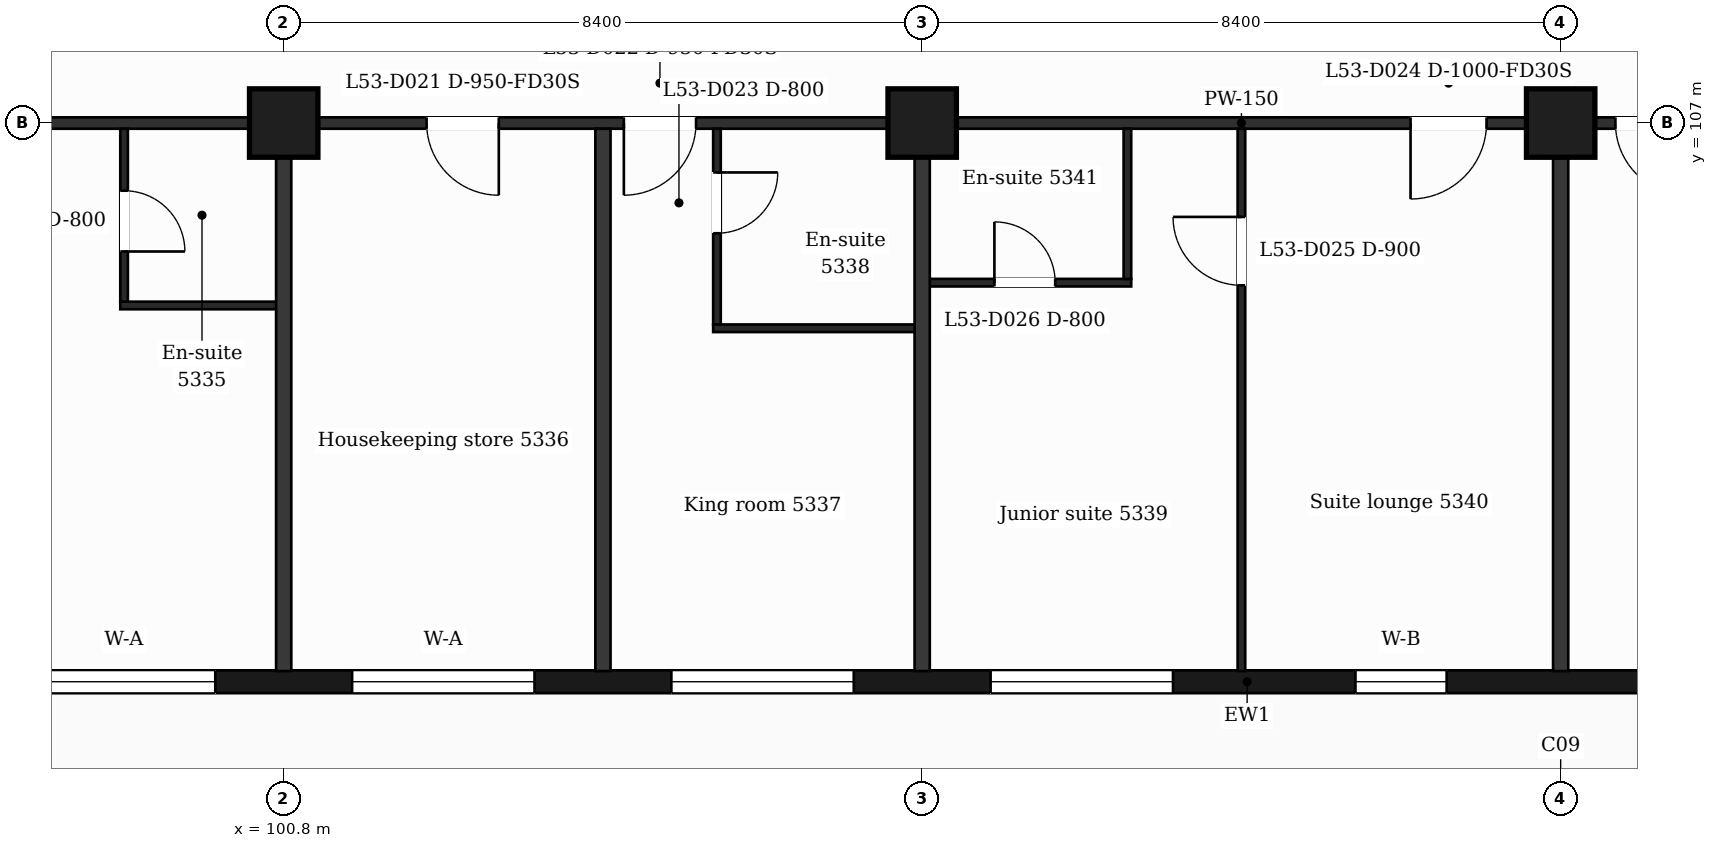
"""IFC4 building model, lengths in metres.
Left out: names, types, materials, properties, quantities, classifications, styles, units other than length and angle.
Written with IfcOpenShell. Run it as: python <this file> out.ifc"""

import sys

from ifc_helpers import new_model, si_unit, direction, frame, frame_2d, origin, origin_2d, place, context, subcontext, project, spatial, rectangle, extrude, element, fill, save


model = new_model("IFC4")
c1 = context("Model", 3, precision=1e-05, world=origin(), true_north=direction((0.0, 1.0)))
c2 = subcontext(c1, "Body", "Model", "MODEL_VIEW")
j1 = project(units=[si_unit("LENGTHUNIT", "METRE"), si_unit("PLANEANGLEUNIT", "RADIAN")], contexts=[c1])
p1 = place(None, origin())
s1 = spatial("IfcSite", under=j1, at=p1, CompositionType="ELEMENT")
p2 = place(p1, origin())
s2 = spatial("IfcBuilding", under=s1, at=p2, CompositionType="ELEMENT")
p3 = place(p2, frame((0.0, 0.0, 220.7)))
s3 = spatial("IfcBuildingStorey", under=s2, at=p3, CompositionType="ELEMENT", Elevation=220.7)
for number, where, z_axis, x_axis in (
    (1, (100.8, 107.0, 0.0), (0.0, 0.0, 1.0), (1.0, 0.0, 0.0)),
    (2, (109.2, 107.0, 0.0), (0.0, 0.0, 1.0), (1.0, 0.0, 0.0)),
    (3, (117.6, 107.0, 0.0), (0.0, 0.0, 1.0), (1.0, 0.0, 0.0)),
):
    element("IfcColumn", number, at=place(p3, frame(where, z_axis=z_axis, x_axis=x_axis)), inside=s3, PredefinedType="COLUMN", context=c2, shape_type="SweptSolid", body=[
        extrude(rectangle(XDim=0.9, YDim=0.9, at=origin_2d()), origin(), (0.0, 0.0, 1.0), 3.7),
    ])
p4 = place(p3, frame((89.85, 99.65, 0.0), z_axis=(0.0, 0.0, 1.0), x_axis=(1.0, 0.0, 0.0)))
e4 = element("IfcWall", 4, at=p4, inside=s3, PredefinedType="SOLIDWALL", context=c2, shape_type="SweptSolid", body=[
    extrude(rectangle(XDim=47.25, YDim=0.3, at=frame_2d((23.625, 0.0))), origin(), (0.0, 0.0, 1.0), 3.38),
])
p5 = place(p4, frame((0.725, 0.0, 0.9)))
e5 = element("IfcOpeningElement", 5, at=p5, cuts=e4, PredefinedType="OPENING", context=c2, shape_type="SweptSolid", body=[
    extrude(rectangle(XDim=1.2, YDim=2.1, at=frame_2d((0.6, 1.05))), frame((0.0, 0.16, 0.0), z_axis=(0.0, -1.0, 0.0), x_axis=(1.0, 0.0, 0.0)), (0.0, 0.0, 1.0), 0.32),
])
p6 = place(p4, frame((3.45, 0.0, 0.9)))
e6 = element("IfcOpeningElement", 6, at=p6, cuts=e4, PredefinedType="OPENING", context=c2, shape_type="SweptSolid", body=[
    extrude(rectangle(XDim=2.4, YDim=2.1, at=frame_2d((1.2, 1.05))), frame((0.0, 0.16, 0.0), z_axis=(0.0, -1.0, 0.0), x_axis=(1.0, 0.0, 0.0)), (0.0, 0.0, 1.0), 0.32),
])
p7 = place(p4, frame((7.65, 0.0, 0.9)))
e7 = element("IfcOpeningElement", 7, at=p7, cuts=e4, PredefinedType="OPENING", context=c2, shape_type="SweptSolid", body=[
    extrude(rectangle(XDim=2.4, YDim=2.1, at=frame_2d((1.2, 1.05))), frame((0.0, 0.16, 0.0), z_axis=(0.0, -1.0, 0.0), x_axis=(1.0, 0.0, 0.0)), (0.0, 0.0, 1.0), 0.32),
])
p8 = place(p4, frame((11.85, 0.0, 0.9)))
e8 = element("IfcOpeningElement", 8, at=p8, cuts=e4, PredefinedType="OPENING", context=c2, shape_type="SweptSolid", body=[
    extrude(rectangle(XDim=2.4, YDim=2.1, at=frame_2d((1.2, 1.05))), frame((0.0, 0.16, 0.0), z_axis=(0.0, -1.0, 0.0), x_axis=(1.0, 0.0, 0.0)), (0.0, 0.0, 1.0), 0.32),
])
p9 = place(p4, frame((16.05, 0.0, 0.9)))
e9 = element("IfcOpeningElement", 9, at=p9, cuts=e4, PredefinedType="OPENING", context=c2, shape_type="SweptSolid", body=[
    extrude(rectangle(XDim=2.4, YDim=2.1, at=frame_2d((1.2, 1.05))), frame((0.0, 0.16, 0.0), z_axis=(0.0, -1.0, 0.0), x_axis=(1.0, 0.0, 0.0)), (0.0, 0.0, 1.0), 0.32),
])
p10 = place(p4, frame((20.25, 0.0, 0.9)))
e10 = element("IfcOpeningElement", 10, at=p10, cuts=e4, PredefinedType="OPENING", context=c2, shape_type="SweptSolid", body=[
    extrude(rectangle(XDim=2.4, YDim=2.1, at=frame_2d((1.2, 1.05))), frame((0.0, 0.16, 0.0), z_axis=(0.0, -1.0, 0.0), x_axis=(1.0, 0.0, 0.0)), (0.0, 0.0, 1.0), 0.32),
])
p11 = place(p4, frame((25.05, 0.0, 0.9)))
e11 = element("IfcOpeningElement", 11, at=p11, cuts=e4, PredefinedType="OPENING", context=c2, shape_type="SweptSolid", body=[
    extrude(rectangle(XDim=1.2, YDim=2.1, at=frame_2d((0.6, 1.05))), frame((0.0, 0.16, 0.0), z_axis=(0.0, -1.0, 0.0), x_axis=(1.0, 0.0, 0.0)), (0.0, 0.0, 1.0), 0.32),
])
p12 = place(p4, frame((29.25, 0.0, 0.9)))
e12 = element("IfcOpeningElement", 12, at=p12, cuts=e4, PredefinedType="OPENING", context=c2, shape_type="SweptSolid", body=[
    extrude(rectangle(XDim=1.2, YDim=2.1, at=frame_2d((0.6, 1.05))), frame((0.0, 0.16, 0.0), z_axis=(0.0, -1.0, 0.0), x_axis=(1.0, 0.0, 0.0)), (0.0, 0.0, 1.0), 0.32),
])
p13 = place(p4, frame((32.55, 0.0, 0.0)))
e13 = element("IfcOpeningElement", 13, at=p13, cuts=e4, PredefinedType="OPENING", context=c2, shape_type="SweptSolid", body=[
    extrude(rectangle(XDim=1.2, YDim=2.4, at=frame_2d((0.6, 1.2))), frame((0.0, 0.16, 0.0), z_axis=(0.0, -1.0, 0.0), x_axis=(1.0, 0.0, 0.0)), (0.0, 0.0, 1.0), 0.32),
])
p14 = place(p4, frame((34.35, 0.0, 0.9)))
e14 = element("IfcOpeningElement", 14, at=p14, cuts=e4, PredefinedType="OPENING", context=c2, shape_type="SweptSolid", body=[
    extrude(rectangle(XDim=1.2, YDim=2.1, at=frame_2d((0.6, 1.05))), frame((0.0, 0.16, 0.0), z_axis=(0.0, -1.0, 0.0), x_axis=(1.0, 0.0, 0.0)), (0.0, 0.0, 1.0), 0.32),
])
p15 = place(p4, frame((37.05, 0.0, 0.9)))
e15 = element("IfcOpeningElement", 15, at=p15, cuts=e4, PredefinedType="OPENING", context=c2, shape_type="SweptSolid", body=[
    extrude(rectangle(XDim=2.4, YDim=2.1, at=frame_2d((1.2, 1.05))), frame((0.0, 0.16, 0.0), z_axis=(0.0, -1.0, 0.0), x_axis=(1.0, 0.0, 0.0)), (0.0, 0.0, 1.0), 0.32),
])
p16 = place(p4, frame((40.95, 0.0, 0.0)))
e16 = element("IfcOpeningElement", 16, at=p16, cuts=e4, PredefinedType="OPENING", context=c2, shape_type="SweptSolid", body=[
    extrude(rectangle(XDim=1.2, YDim=2.4, at=frame_2d((0.6, 1.2))), frame((0.0, 0.16, 0.0), z_axis=(0.0, -1.0, 0.0), x_axis=(1.0, 0.0, 0.0)), (0.0, 0.0, 1.0), 0.32),
])
p17 = place(p4, frame((42.75, 0.0, 0.9)))
e17 = element("IfcOpeningElement", 17, at=p17, cuts=e4, PredefinedType="OPENING", context=c2, shape_type="SweptSolid", body=[
    extrude(rectangle(XDim=1.2, YDim=2.1, at=frame_2d((0.6, 1.05))), frame((0.0, 0.16, 0.0), z_axis=(0.0, -1.0, 0.0), x_axis=(1.0, 0.0, 0.0)), (0.0, 0.0, 1.0), 0.32),
])
p18 = place(p4, frame((45.25, 0.0, 0.9)))
e18 = element("IfcOpeningElement", 18, at=p18, cuts=e4, PredefinedType="OPENING", context=c2, shape_type="SweptSolid", body=[
    extrude(rectangle(XDim=1.2, YDim=2.1, at=frame_2d((0.6, 1.05))), frame((0.0, 0.16, 0.0), z_axis=(0.0, -1.0, 0.0), x_axis=(1.0, 0.0, 0.0)), (0.0, 0.0, 1.0), 0.32),
])
p19 = place(p3, frame((106.45, 104.3, 0.0), z_axis=(0.0, 0.0, 1.0), x_axis=(1.0, 0.0, 0.0)))
e19 = element("IfcWall", 19, at=p19, inside=s3, PredefinedType="PARTITIONING", context=c2, shape_type="SweptSolid", body=[
    extrude(rectangle(XDim=2.75, YDim=0.1, at=frame_2d((1.375, 0.0))), origin(), (0.0, 0.0, 1.0), 3.38),
])
p20 = place(p3, frame((98.65, 104.6, 0.0), z_axis=(0.0, 0.0, 1.0), x_axis=(1.0, 0.0, 0.0)))
e20 = element("IfcWall", 20, at=p20, inside=s3, PredefinedType="PARTITIONING", context=c2, shape_type="SweptSolid", body=[
    extrude(rectangle(XDim=2.15, YDim=0.1, at=frame_2d((1.075, 0.0))), origin(), (0.0, 0.0, 1.0), 3.38),
])
p21 = place(p3, frame((109.2, 104.9, 0.0), z_axis=(0.0, 0.0, 1.0), x_axis=(1.0, 0.0, 0.0)))
e21 = element("IfcWall", 21, at=p21, inside=s3, PredefinedType="PARTITIONING", context=c2, shape_type="SweptSolid", body=[
    extrude(rectangle(XDim=2.75, YDim=0.1, at=frame_2d((1.375, 0.0))), origin(), (0.0, 0.0, 1.0), 3.38),
])
p22 = place(p21, frame((0.95, 0.0, 0.0)))
e22 = element("IfcOpeningElement", 22, at=p22, cuts=e21, PredefinedType="OPENING", context=c2, shape_type="SweptSolid", body=[
    extrude(rectangle(XDim=0.8, YDim=2.1, at=frame_2d((0.4, 1.05))), frame((0.0, 0.06, 0.0), z_axis=(0.0, -1.0, 0.0), x_axis=(1.0, 0.0, 0.0)), (0.0, 0.0, 1.0), 0.12),
])
p23 = place(p3, frame((87.018, 107.0, 0.0), z_axis=(0.0, 0.0, 1.0), x_axis=(1.0, 0.0, 0.0)))
e23 = element("IfcWall", 23, at=p23, inside=s3, PredefinedType="PARTITIONING", context=c2, shape_type="SweptSolid", body=[
    extrude(rectangle(XDim=52.765, YDim=0.15, at=frame_2d((26.382, 0.0))), origin(), (0.0, 0.0, 1.0), 3.38),
])
p24 = place(p23, frame((0.707, 0.0, 0.0)))
e24 = element("IfcOpeningElement", 24, at=p24, cuts=e23, PredefinedType="OPENING", context=c2, shape_type="SweptSolid", body=[
    extrude(rectangle(XDim=0.95, YDim=2.1, at=frame_2d((0.475, 1.05))), frame((0.0, 0.085, 0.0), z_axis=(0.0, -1.0, 0.0), x_axis=(1.0, 0.0, 0.0)), (0.0, 0.0, 1.0), 0.17),
])
p25 = place(p23, frame((6.894, 0.0, 0.0)))
e25 = element("IfcOpeningElement", 25, at=p25, cuts=e23, PredefinedType="OPENING", context=c2, shape_type="SweptSolid", body=[
    extrude(rectangle(XDim=0.95, YDim=2.1, at=frame_2d((0.475, 1.05))), frame((0.0, 0.085, 0.0), z_axis=(0.0, -1.0, 0.0), x_axis=(1.0, 0.0, 0.0)), (0.0, 0.0, 1.0), 0.17),
])
p26 = place(p23, frame((15.662, 0.0, 0.0)))
e26 = element("IfcOpeningElement", 26, at=p26, cuts=e23, PredefinedType="OPENING", context=c2, shape_type="SweptSolid", body=[
    extrude(rectangle(XDim=0.95, YDim=2.1, at=frame_2d((0.475, 1.05))), frame((0.0, 0.085, 0.0), z_axis=(0.0, -1.0, 0.0), x_axis=(1.0, 0.0, 0.0)), (0.0, 0.0, 1.0), 0.17),
])
p27 = place(p23, frame((18.257, 0.0, 0.0)))
e27 = element("IfcOpeningElement", 27, at=p27, cuts=e23, PredefinedType="OPENING", context=c2, shape_type="SweptSolid", body=[
    extrude(rectangle(XDim=0.95, YDim=2.1, at=frame_2d((0.475, 1.05))), frame((0.0, 0.085, 0.0), z_axis=(0.0, -1.0, 0.0), x_axis=(1.0, 0.0, 0.0)), (0.0, 0.0, 1.0), 0.17),
])
p28 = place(p23, frame((28.607, 0.0, 0.0)))
e28 = element("IfcOpeningElement", 28, at=p28, cuts=e23, PredefinedType="OPENING", context=c2, shape_type="SweptSolid", body=[
    extrude(rectangle(XDim=1.0, YDim=2.1, at=frame_2d((0.5, 1.05))), frame((0.0, 0.085, 0.0), z_axis=(0.0, -1.0, 0.0), x_axis=(1.0, 0.0, 0.0)), (0.0, 0.0, 1.0), 0.17),
])
p29 = place(p23, frame((31.302, 0.0, 0.0)))
e29 = element("IfcOpeningElement", 29, at=p29, cuts=e23, PredefinedType="OPENING", context=c2, shape_type="SweptSolid", body=[
    extrude(rectangle(XDim=0.95, YDim=2.1, at=frame_2d((0.475, 1.05))), frame((0.0, 0.085, 0.0), z_axis=(0.0, -1.0, 0.0), x_axis=(1.0, 0.0, 0.0)), (0.0, 0.0, 1.0), 0.17),
])
p30 = place(p23, frame((35.057, 0.0, 0.0)))
e30 = element("IfcOpeningElement", 30, at=p30, cuts=e23, PredefinedType="OPENING", context=c2, shape_type="SweptSolid", body=[
    extrude(rectangle(XDim=0.95, YDim=2.1, at=frame_2d((0.475, 1.05))), frame((0.0, 0.085, 0.0), z_axis=(0.0, -1.0, 0.0), x_axis=(1.0, 0.0, 0.0)), (0.0, 0.0, 1.0), 0.17),
])
p31 = place(p23, frame((41.957, 0.0, 0.0)))
e31 = element("IfcOpeningElement", 31, at=p31, cuts=e23, PredefinedType="OPENING", context=c2, shape_type="SweptSolid", body=[
    extrude(rectangle(XDim=0.95, YDim=2.1, at=frame_2d((0.475, 1.05))), frame((0.0, 0.085, 0.0), z_axis=(0.0, -1.0, 0.0), x_axis=(1.0, 0.0, 0.0)), (0.0, 0.0, 1.0), 0.17),
])
p32 = place(p23, frame((45.712, 0.0, 0.0)))
e32 = element("IfcOpeningElement", 32, at=p32, cuts=e23, PredefinedType="OPENING", context=c2, shape_type="SweptSolid", body=[
    extrude(rectangle(XDim=1.0, YDim=2.1, at=frame_2d((0.5, 1.05))), frame((0.0, 0.085, 0.0), z_axis=(0.0, -1.0, 0.0), x_axis=(1.0, 0.0, 0.0)), (0.0, 0.0, 1.0), 0.17),
])
p33 = place(p23, frame((48.974, 0.0, 0.0)))
e33 = element("IfcOpeningElement", 33, at=p33, cuts=e23, PredefinedType="OPENING", context=c2, shape_type="SweptSolid", body=[
    extrude(rectangle(XDim=0.95, YDim=2.1, at=frame_2d((0.475, 1.05))), frame((0.0, 0.085, 0.0), z_axis=(0.0, -1.0, 0.0), x_axis=(1.0, 0.0, 0.0)), (0.0, 0.0, 1.0), 0.17),
])
p34 = place(p3, frame((98.7, 104.65, 0.0), z_axis=(0.0, 0.0, 1.0), x_axis=(0.0, 1.0, 0.0)))
e34 = element("IfcWall", 34, at=p34, inside=s3, PredefinedType="PARTITIONING", context=c2, shape_type="SweptSolid", body=[
    extrude(rectangle(XDim=2.275, YDim=0.1, at=frame_2d((1.138, 0.0))), origin(), (0.0, 0.0, 1.0), 3.38),
])
p35 = place(p34, frame((0.66, 0.0, 0.0)))
e35 = element("IfcOpeningElement", 35, at=p35, cuts=e34, PredefinedType="OPENING", context=c2, shape_type="SweptSolid", body=[
    extrude(rectangle(XDim=0.8, YDim=2.1, at=frame_2d((0.4, 1.05))), frame((0.0, 0.06, 0.0), z_axis=(0.0, -1.0, 0.0), x_axis=(1.0, 0.0, 0.0)), (0.0, 0.0, 1.0), 0.12),
])
for number, where, z_axis, x_axis in (
    (36, (100.8, 99.79, 0.0), (0.0, 0.0, 1.0), (0.0, 1.0, 0.0)),
    (37, (105.0, 99.79, 0.0), (0.0, 0.0, 1.0), (0.0, 1.0, 0.0)),
):
    element("IfcWall", number, at=place(p3, frame(where, z_axis=z_axis, x_axis=x_axis)), inside=s3, PredefinedType="PARTITIONING", context=c2, shape_type="SweptSolid", body=[
        extrude(rectangle(XDim=7.135, YDim=0.2, at=frame_2d((3.567, 0.0))), origin(), (0.0, 0.0, 1.0), 3.38),
    ])
p36 = place(p3, frame((106.5, 104.35, 0.0), z_axis=(0.0, 0.0, 1.0), x_axis=(0.0, 1.0, 0.0)))
e38 = element("IfcWall", 38, at=p36, inside=s3, PredefinedType="PARTITIONING", context=c2, shape_type="SweptSolid", body=[
    extrude(rectangle(XDim=2.575, YDim=0.1, at=frame_2d((1.288, 0.0))), origin(), (0.0, 0.0, 1.0), 3.38),
])
p37 = place(p36, frame((1.2, 0.0, 0.0)))
e39 = element("IfcOpeningElement", 39, at=p37, cuts=e38, PredefinedType="OPENING", context=c2, shape_type="SweptSolid", body=[
    extrude(rectangle(XDim=0.8, YDim=2.1, at=frame_2d((0.4, 1.05))), frame((0.0, 0.06, 0.0), z_axis=(0.0, -1.0, 0.0), x_axis=(1.0, 0.0, 0.0)), (0.0, 0.0, 1.0), 0.12),
])
p38 = place(p3, frame((109.2, 99.79, 0.0), z_axis=(0.0, 0.0, 1.0), x_axis=(0.0, 1.0, 0.0)))
e40 = element("IfcWall", 40, at=p38, inside=s3, PredefinedType="PARTITIONING", context=c2, shape_type="SweptSolid", body=[
    extrude(rectangle(XDim=7.135, YDim=0.2, at=frame_2d((3.567, 0.0))), origin(), (0.0, 0.0, 1.0), 3.38),
])
p39 = place(p3, frame((111.9, 104.95, 0.0), z_axis=(0.0, 0.0, 1.0), x_axis=(0.0, 1.0, 0.0)))
e41 = element("IfcWall", 41, at=p39, inside=s3, PredefinedType="PARTITIONING", context=c2, shape_type="SweptSolid", body=[
    extrude(rectangle(XDim=1.975, YDim=0.1, at=frame_2d((0.988, 0.0))), origin(), (0.0, 0.0, 1.0), 3.38),
])
p40 = place(p3, frame((113.4, 99.79, 0.0), z_axis=(0.0, 0.0, 1.0), x_axis=(0.0, 1.0, 0.0)))
e42 = element("IfcWall", 42, at=p40, inside=s3, PredefinedType="PARTITIONING", context=c2, shape_type="SweptSolid", body=[
    extrude(rectangle(XDim=7.135, YDim=0.1, at=frame_2d((3.567, 0.0))), origin(), (0.0, 0.0, 1.0), 3.38),
])
p41 = place(p40, frame((5.075, 0.0, 0.0)))
e43 = element("IfcOpeningElement", 43, at=p41, cuts=e42, PredefinedType="OPENING", context=c2, shape_type="SweptSolid", body=[
    extrude(rectangle(XDim=0.9, YDim=2.1, at=frame_2d((0.45, 1.05))), frame((0.0, 0.06, 0.0), z_axis=(0.0, -1.0, 0.0), x_axis=(1.0, 0.0, 0.0)), (0.0, 0.0, 1.0), 0.12),
])
p42 = place(p3, frame((117.6, 99.79, 0.0), z_axis=(0.0, 0.0, 1.0), x_axis=(0.0, 1.0, 0.0)))
e44 = element("IfcWall", 44, at=p42, inside=s3, PredefinedType="PARTITIONING", context=c2, shape_type="SweptSolid", body=[
    extrude(rectangle(XDim=7.135, YDim=0.2, at=frame_2d((3.567, 0.0))), origin(), (0.0, 0.0, 1.0), 3.38),
])
p43 = place(p7, origin())
e45 = element("IfcWindow", 45, at=p43, inside=s3, PartitioningType="SINGLE_PANEL", PredefinedType="WINDOW", context=c2, shape_type="SweptSolid", body=[
    extrude(rectangle(XDim=2.4, YDim=2.1, at=frame_2d((1.2, 1.05))), frame((0.0, 0.03, 0.0), z_axis=(0.0, -1.0, 0.0), x_axis=(1.0, 0.0, 0.0)), (0.0, 0.0, 1.0), 0.06),
])
fill(e7, e45)
p44 = place(p8, origin())
e46 = element("IfcWindow", 46, at=p44, inside=s3, PartitioningType="SINGLE_PANEL", PredefinedType="WINDOW", context=c2, shape_type="SweptSolid", body=[
    extrude(rectangle(XDim=2.4, YDim=2.1, at=frame_2d((1.2, 1.05))), frame((0.0, 0.03, 0.0), z_axis=(0.0, -1.0, 0.0), x_axis=(1.0, 0.0, 0.0)), (0.0, 0.0, 1.0), 0.06),
])
fill(e8, e46)
p45 = place(p9, origin())
e47 = element("IfcWindow", 47, at=p45, inside=s3, PartitioningType="SINGLE_PANEL", PredefinedType="WINDOW", context=c2, shape_type="SweptSolid", body=[
    extrude(rectangle(XDim=2.4, YDim=2.1, at=frame_2d((1.2, 1.05))), frame((0.0, 0.03, 0.0), z_axis=(0.0, -1.0, 0.0), x_axis=(1.0, 0.0, 0.0)), (0.0, 0.0, 1.0), 0.06),
])
fill(e9, e47)
p46 = place(p10, origin())
e48 = element("IfcWindow", 48, at=p46, inside=s3, PartitioningType="SINGLE_PANEL", PredefinedType="WINDOW", context=c2, shape_type="SweptSolid", body=[
    extrude(rectangle(XDim=2.4, YDim=2.1, at=frame_2d((1.2, 1.05))), frame((0.0, 0.03, 0.0), z_axis=(0.0, -1.0, 0.0), x_axis=(1.0, 0.0, 0.0)), (0.0, 0.0, 1.0), 0.06),
])
fill(e10, e48)
p47 = place(p11, origin())
e49 = element("IfcWindow", 49, at=p47, inside=s3, PartitioningType="SINGLE_PANEL", PredefinedType="WINDOW", context=c2, shape_type="SweptSolid", body=[
    extrude(rectangle(XDim=1.2, YDim=2.1, at=frame_2d((0.6, 1.05))), frame((0.0, 0.03, 0.0), z_axis=(0.0, -1.0, 0.0), x_axis=(1.0, 0.0, 0.0)), (0.0, 0.0, 1.0), 0.06),
])
fill(e11, e49)
p48 = place(p35, origin())
e50 = element("IfcDoor", 50, at=p48, inside=s3, OperationType="SINGLE_SWING_LEFT", PredefinedType="DOOR", context=c2, shape_type="SweptSolid", body=[
    extrude(rectangle(XDim=0.8, YDim=2.1, at=frame_2d((0.4, 1.05))), frame((0.0, 0.025, 0.0), z_axis=(0.0, -1.0, 0.0), x_axis=(1.0, 0.0, 0.0)), (0.0, 0.0, 1.0), 0.05),
])
fill(e35, e50)
p49 = place(p26, origin())
e51 = element("IfcDoor", 51, at=p49, inside=s3, OperationType="SINGLE_SWING_RIGHT", PredefinedType="DOOR", context=c2, shape_type="SweptSolid", body=[
    extrude(rectangle(XDim=0.95, YDim=2.1, at=frame_2d((0.475, 1.05))), frame((0.0, 0.025, 0.0), z_axis=(0.0, -1.0, 0.0), x_axis=(1.0, 0.0, 0.0)), (0.0, 0.0, 1.0), 0.05),
])
fill(e26, e51)
p50 = place(p27, origin())
e52 = element("IfcDoor", 52, at=p50, inside=s3, OperationType="SINGLE_SWING_LEFT", PredefinedType="DOOR", context=c2, shape_type="SweptSolid", body=[
    extrude(rectangle(XDim=0.95, YDim=2.1, at=frame_2d((0.475, 1.05))), frame((0.0, 0.025, 0.0), z_axis=(0.0, -1.0, 0.0), x_axis=(1.0, 0.0, 0.0)), (0.0, 0.0, 1.0), 0.05),
])
fill(e27, e52)
p51 = place(p37, origin())
e53 = element("IfcDoor", 53, at=p51, inside=s3, OperationType="SINGLE_SWING_RIGHT", PredefinedType="DOOR", context=c2, shape_type="SweptSolid", body=[
    extrude(rectangle(XDim=0.8, YDim=2.1, at=frame_2d((0.4, 1.05))), frame((0.0, 0.025, 0.0), z_axis=(0.0, -1.0, 0.0), x_axis=(1.0, 0.0, 0.0)), (0.0, 0.0, 1.0), 0.05),
])
fill(e39, e53)
p52 = place(p28, origin())
e54 = element("IfcDoor", 54, at=p52, inside=s3, OperationType="SINGLE_SWING_LEFT", PredefinedType="DOOR", context=c2, shape_type="SweptSolid", body=[
    extrude(rectangle(XDim=1.0, YDim=2.1, at=frame_2d((0.5, 1.05))), frame((0.0, 0.025, 0.0), z_axis=(0.0, -1.0, 0.0), x_axis=(1.0, 0.0, 0.0)), (0.0, 0.0, 1.0), 0.05),
])
fill(e28, e54)
p53 = place(p41, origin())
e55 = element("IfcDoor", 55, at=p53, inside=s3, OperationType="SINGLE_SWING_RIGHT", PredefinedType="DOOR", context=c2, shape_type="SweptSolid", body=[
    extrude(rectangle(XDim=0.9, YDim=2.1, at=frame_2d((0.45, 1.05))), frame((0.0, 0.025, 0.0), z_axis=(0.0, -1.0, 0.0), x_axis=(1.0, 0.0, 0.0)), (0.0, 0.0, 1.0), 0.05),
])
fill(e43, e55)
p54 = place(p22, origin())
e56 = element("IfcDoor", 56, at=p54, inside=s3, OperationType="SINGLE_SWING_LEFT", PredefinedType="DOOR", context=c2, shape_type="SweptSolid", body=[
    extrude(rectangle(XDim=0.8, YDim=2.1, at=frame_2d((0.4, 1.05))), frame((0.0, 0.025, 0.0), z_axis=(0.0, -1.0, 0.0), x_axis=(1.0, 0.0, 0.0)), (0.0, 0.0, 1.0), 0.05),
])
fill(e22, e56)
p55 = place(p29, origin())
e57 = element("IfcDoor", 57, at=p55, inside=s3, OperationType="SINGLE_SWING_RIGHT", PredefinedType="DOOR", context=c2, shape_type="SweptSolid", body=[
    extrude(rectangle(XDim=0.95, YDim=2.1, at=frame_2d((0.475, 1.05))), frame((0.0, 0.025, 0.0), z_axis=(0.0, -1.0, 0.0), x_axis=(1.0, 0.0, 0.0)), (0.0, 0.0, 1.0), 0.05),
])
fill(e29, e57)
save(model, sys.argv[1])
